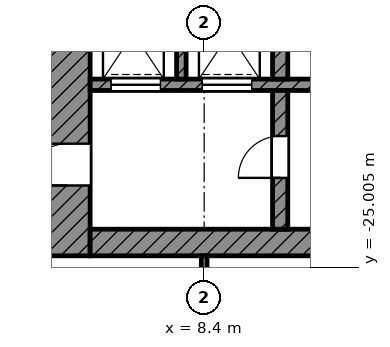
"""IFC4 building model, lengths in metres.
Left out: names, types, materials, properties, quantities, classifications, styles, units other than length and angle.
Written with IfcOpenShell. Run it as: python <this file> out.ifc"""

import sys

from ifc_helpers import new_model, si_unit, direction, frame, frame_2d, origin, place, context, subcontext, project, spatial, rectangle, extrude, element, fill, save


model = new_model("IFC4")
c1 = context("Model", 3, precision=1e-05, world=origin(), true_north=direction((0.0, 1.0)))
c2 = subcontext(c1, "Body", "Model", "MODEL_VIEW")
j1 = project(units=[si_unit("LENGTHUNIT", "METRE"), si_unit("PLANEANGLEUNIT", "RADIAN")], contexts=[c1])
p1 = place(None, origin())
s1 = spatial("IfcSite", under=j1, at=p1, CompositionType="ELEMENT")
p2 = place(p1, origin())
s2 = spatial("IfcBuilding", under=s1, at=p2, CompositionType="ELEMENT")
p3 = place(p2, frame((0.0, 0.0, 302.8)))
s3 = spatial("IfcBuildingStorey", under=s2, at=p3, CompositionType="ELEMENT", Elevation=302.8)
p4 = place(p3, frame((4.8, -24.7, 0.0), z_axis=(0.0, 0.0, 1.0), x_axis=(0.0, 1.0, 0.0)))
e1 = element("IfcWall", 1, at=p4, inside=s3, PredefinedType="SHEAR", context=c2, shape_type="SweptSolid", body=[
    extrude(rectangle(XDim=19.3, YDim=1.2, at=frame_2d((9.65, 0.0))), origin(), (0.0, 0.0, 1.0), 3.6),
])
p5 = place(p4, frame((11.15, 0.0, 0.0)))
e2 = element("IfcOpeningElement", 2, at=p5, cuts=e1, PredefinedType="OPENING", context=c2, shape_type="SweptSolid", body=[
    extrude(rectangle(XDim=1.1, YDim=2.1, at=frame_2d((0.55, 1.05))), frame((0.0, 0.61, 0.0), z_axis=(0.0, -1.0, 0.0), x_axis=(1.0, 0.0, 0.0)), (0.0, 0.0, 1.0), 1.22),
])
p6 = place(p4, frame((1.85, 0.0, 0.0)))
e3 = element("IfcOpeningElement", 3, at=p6, cuts=e1, PredefinedType="OPENING", context=c2, shape_type="SweptSolid", body=[
    extrude(rectangle(XDim=1.1, YDim=2.1, at=frame_2d((0.55, 1.05))), frame((0.0, 0.61, 0.0), z_axis=(0.0, -1.0, 0.0), x_axis=(1.0, 0.0, 0.0)), (0.0, 0.0, 1.0), 1.22),
])
p7 = place(p3, frame((5.4, -24.35, 0.0), z_axis=(0.0, 0.0, 1.0), x_axis=(1.0, 0.0, 0.0)))
e4 = element("IfcWall", 4, at=p7, inside=s3, PredefinedType="SHEAR", context=c2, shape_type="SweptSolid", body=[
    extrude(rectangle(XDim=18.6, YDim=0.7, at=frame_2d((9.3, 0.0))), origin(), (0.0, 0.0, 1.0), 3.6),
])
p8 = place(p7, frame((6.3, 0.0, 0.0)))
e5 = element("IfcOpeningElement", 5, at=p8, cuts=e4, PredefinedType="OPENING", context=c2, shape_type="SweptSolid", body=[
    extrude(rectangle(XDim=1.8, YDim=2.1, at=frame_2d((0.9, 1.05))), frame((0.0, 0.36, 0.0), z_axis=(0.0, -1.0, 0.0), x_axis=(1.0, 0.0, 0.0)), (0.0, 0.0, 1.0), 0.72),
])
p9 = place(p3, frame((5.4, -20.2, 0.0), z_axis=(0.0, 0.0, 1.0), x_axis=(1.0, 0.0, 0.0)))
e6 = element("IfcWall", 6, at=p9, inside=s3, PredefinedType="SHEAR", context=c2, shape_type="SweptSolid", body=[
    extrude(rectangle(XDim=14.65, YDim=0.3, at=frame_2d((7.325, 0.0))), origin(), (0.0, 0.0, 1.0), 3.6),
])
p10 = place(p9, frame((10.55, 0.0, 0.0)))
e7 = element("IfcOpeningElement", 7, at=p10, cuts=e6, PredefinedType="OPENING", context=c2, shape_type="SweptSolid", body=[
    extrude(rectangle(XDim=1.3, YDim=2.1, at=frame_2d((0.65, 1.05))), frame((0.0, 0.16, 0.0), z_axis=(0.0, -1.0, 0.0), x_axis=(1.0, 0.0, 0.0)), (0.0, 0.0, 1.0), 0.32),
])
p11 = place(p9, frame((12.95, 0.0, 0.0)))
e8 = element("IfcOpeningElement", 8, at=p11, cuts=e6, PredefinedType="OPENING", context=c2, shape_type="SweptSolid", body=[
    extrude(rectangle(XDim=1.3, YDim=2.1, at=frame_2d((0.65, 1.05))), frame((0.0, 0.16, 0.0), z_axis=(0.0, -1.0, 0.0), x_axis=(1.0, 0.0, 0.0)), (0.0, 0.0, 1.0), 0.32),
])
p12 = place(p9, frame((0.55, 0.0, 0.0)))
e9 = element("IfcOpeningElement", 9, at=p12, cuts=e6, PredefinedType="OPENING", context=c2, shape_type="SweptSolid", body=[
    extrude(rectangle(XDim=1.3, YDim=2.1, at=frame_2d((0.65, 1.05))), frame((0.0, 0.16, 0.0), z_axis=(0.0, -1.0, 0.0), x_axis=(1.0, 0.0, 0.0)), (0.0, 0.0, 1.0), 0.32),
])
p13 = place(p9, frame((2.95, 0.0, 0.0)))
e10 = element("IfcOpeningElement", 10, at=p13, cuts=e6, PredefinedType="OPENING", context=c2, shape_type="SweptSolid", body=[
    extrude(rectangle(XDim=1.3, YDim=2.1, at=frame_2d((0.65, 1.05))), frame((0.0, 0.16, 0.0), z_axis=(0.0, -1.0, 0.0), x_axis=(1.0, 0.0, 0.0)), (0.0, 0.0, 1.0), 0.32),
])
p14 = place(p9, frame((5.95, 0.0, 0.0)))
e11 = element("IfcOpeningElement", 11, at=p14, cuts=e6, PredefinedType="OPENING", context=c2, shape_type="SweptSolid", body=[
    extrude(rectangle(XDim=0.9, YDim=2.1, at=frame_2d((0.45, 1.05))), frame((0.0, 0.16, 0.0), z_axis=(0.0, -1.0, 0.0), x_axis=(1.0, 0.0, 0.0)), (0.0, 0.0, 1.0), 0.32),
])
p15 = place(p9, frame((8.35, 0.0, 0.0)))
e12 = element("IfcOpeningElement", 12, at=p15, cuts=e6, PredefinedType="OPENING", context=c2, shape_type="SweptSolid", body=[
    extrude(rectangle(XDim=0.9, YDim=2.1, at=frame_2d((0.45, 1.05))), frame((0.0, 0.16, 0.0), z_axis=(0.0, -1.0, 0.0), x_axis=(1.0, 0.0, 0.0)), (0.0, 0.0, 1.0), 0.32),
])
p16 = place(p3, frame((10.4, -24.0, 0.0), z_axis=(0.0, 0.0, 1.0), x_axis=(0.0, 1.0, 0.0)))
e13 = element("IfcWall", 13, at=p16, inside=s3, PredefinedType="SHEAR", context=c2, shape_type="SweptSolid", body=[
    extrude(rectangle(XDim=3.65, YDim=0.4, at=frame_2d((1.825, 0.0))), origin(), (0.0, 0.0, 1.0), 3.6),
])
p17 = place(p16, frame((1.35, 0.0, 0.0)))
e14 = element("IfcOpeningElement", 14, at=p17, cuts=e13, PredefinedType="OPENING", context=c2, shape_type="SweptSolid", body=[
    extrude(rectangle(XDim=1.1, YDim=2.1, at=frame_2d((0.55, 1.05))), frame((0.0, 0.21, 0.0), z_axis=(0.0, -1.0, 0.0), x_axis=(1.0, 0.0, 0.0)), (0.0, 0.0, 1.0), 0.42),
])
p18 = place(p3, frame((10.4, -20.05, 0.0), z_axis=(0.0, 0.0, 1.0), x_axis=(0.0, 1.0, 0.0)))
e15 = element("IfcWall", 15, at=p18, inside=s3, PredefinedType="SHEAR", context=c2, shape_type="SweptSolid", body=[
    extrude(rectangle(XDim=3.15, YDim=0.4, at=frame_2d((1.575, 0.0))), origin(), (0.0, 0.0, 1.0), 3.6),
])
p19 = place(p3, frame((7.8, -20.05, 0.0), z_axis=(0.0, 0.0, 1.0), x_axis=(0.0, 1.0, 0.0)))
e16 = element("IfcWall", 16, at=p19, inside=s3, PredefinedType="SHEAR", context=c2, shape_type="SweptSolid", body=[
    extrude(rectangle(XDim=3.15, YDim=0.25, at=frame_2d((1.575, 0.0))), origin(), (0.0, 0.0, 1.0), 3.6),
])
p20 = place(p3, frame((8.4, -31.957, 0.0), z_axis=(0.0, 0.0, 1.0), x_axis=(0.0, 1.0, 0.0)))
e17 = element("IfcWall", 17, at=p20, inside=s3, PredefinedType="PARTITIONING", context=c2, shape_type="SweptSolid", body=[
    extrude(rectangle(XDim=7.257, YDim=0.15, at=frame_2d((3.628, 0.0))), origin(), (0.0, 0.0, 1.0), 3.6),
])
p21 = place(p12, origin())
e18 = element("IfcDoor", 18, at=p21, inside=s3, OperationType="DOUBLE_DOOR_SLIDING", PredefinedType="DOOR", context=c2, shape_type="SweptSolid", body=[
    extrude(rectangle(XDim=1.3, YDim=2.1, at=frame_2d((0.65, 1.05))), frame((0.0, 0.025, 0.0), z_axis=(0.0, -1.0, 0.0), x_axis=(1.0, 0.0, 0.0)), (0.0, 0.0, 1.0), 0.05),
])
fill(e9, e18)
p22 = place(p13, origin())
e19 = element("IfcDoor", 19, at=p22, inside=s3, OperationType="DOUBLE_DOOR_SLIDING", PredefinedType="DOOR", context=c2, shape_type="SweptSolid", body=[
    extrude(rectangle(XDim=1.3, YDim=2.1, at=frame_2d((0.65, 1.05))), frame((0.0, 0.025, 0.0), z_axis=(0.0, -1.0, 0.0), x_axis=(1.0, 0.0, 0.0)), (0.0, 0.0, 1.0), 0.05),
])
fill(e10, e19)
p23 = place(p6, origin())
e20 = element("IfcDoor", 20, at=p23, inside=s3, OperationType="SINGLE_SWING_LEFT", PredefinedType="DOOR", context=c2, shape_type="SweptSolid", body=[
    extrude(rectangle(XDim=1.1, YDim=2.1, at=frame_2d((0.55, 1.05))), frame((0.0, 0.025, 0.0), z_axis=(0.0, -1.0, 0.0), x_axis=(1.0, 0.0, 0.0)), (0.0, 0.0, 1.0), 0.05),
])
fill(e3, e20)
p24 = place(p17, origin())
e21 = element("IfcDoor", 21, at=p24, inside=s3, OperationType="SINGLE_SWING_LEFT", PredefinedType="DOOR", context=c2, shape_type="SweptSolid", body=[
    extrude(rectangle(XDim=1.1, YDim=2.1, at=frame_2d((0.55, 1.05))), frame((0.0, 0.025, 0.0), z_axis=(0.0, -1.0, 0.0), x_axis=(1.0, 0.0, 0.0)), (0.0, 0.0, 1.0), 0.05),
])
fill(e14, e21)
save(model, sys.argv[1])
